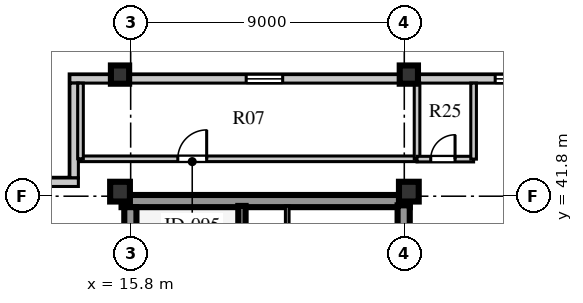
"""IFC4 building model, lengths in metres.
Left out: names, types, materials, properties, quantities, classifications, styles, units other than length and angle.
Written with IfcOpenShell. Run it as: python <this file> out.ifc"""

import sys

from ifc_helpers import new_model, si_unit, direction, frame, frame_2d, origin, origin_2d, place, context, subcontext, project, spatial, rectangle, extrude, element, fill, save


model = new_model("IFC4")
c1 = context("Model", 3, precision=1e-05, world=origin(), true_north=direction((0.0, 1.0)))
c2 = subcontext(c1, "Body", "Model", "MODEL_VIEW")
j1 = project(units=[si_unit("LENGTHUNIT", "METRE"), si_unit("PLANEANGLEUNIT", "RADIAN")], contexts=[c1])
p1 = place(None, origin())
s1 = spatial("IfcSite", under=j1, at=p1, CompositionType="ELEMENT")
p2 = place(p1, origin())
s2 = spatial("IfcBuilding", under=s1, at=p2, CompositionType="ELEMENT")
p3 = place(p2, frame((0.0, 0.0, 335.3)))
s3 = spatial("IfcBuildingStorey", under=s2, at=p3, CompositionType="ELEMENT", Elevation=335.3)
p4 = place(p3, frame((15.5, 41.64, 0.0), z_axis=(0.0, 0.0, 1.0), x_axis=(1.0, 0.0, 0.0)))
e1 = element("IfcWall", 1, at=p4, inside=s3, PredefinedType="SHEAR", context=c2, shape_type="SweptSolid", body=[
    extrude(rectangle(XDim=9.48, YDim=0.4, at=frame_2d((4.74, 0.0))), origin(), (0.0, 0.0, 1.0), 3.56),
])
p5 = place(p3, frame((15.79, 15.81, 0.0), z_axis=(0.0, 0.0, 1.0), x_axis=(0.0, 1.0, 0.0)))
e2 = element("IfcWall", 2, at=p5, inside=s3, PredefinedType="SHEAR", context=c2, shape_type="SweptSolid", body=[
    extrude(rectangle(XDim=25.63, YDim=0.4, at=frame_2d((12.815, 0.0))), origin(), (0.0, 0.0, 1.0), 3.56),
])
p6 = place(p3, frame((24.78, 15.74, 0.0), z_axis=(0.0, 0.0, 1.0), x_axis=(0.0, 1.0, 0.0)))
e3 = element("IfcWall", 3, at=p6, inside=s3, PredefinedType="SHEAR", context=c2, shape_type="SweptSolid", body=[
    extrude(rectangle(XDim=25.76, YDim=0.4, at=frame_2d((12.88, 0.0))), origin(), (0.0, 0.0, 1.0), 3.56),
])
p7 = place(p6, frame((1.61, 0.0, 0.0)))
e4 = element("IfcOpeningElement", 4, at=p7, cuts=e3, PredefinedType="OPENING", context=c2, shape_type="SweptSolid", body=[
    extrude(rectangle(XDim=1.2, YDim=2.1, at=frame_2d((0.6, 1.05))), frame((0.0, 0.21, 0.0), z_axis=(0.0, -1.0, 0.0), x_axis=(1.0, 0.0, 0.0)), (0.0, 0.0, 1.0), 0.42),
])
p8 = place(p6, frame((6.78, 0.0, 0.0)))
e5 = element("IfcOpeningElement", 5, at=p8, cuts=e3, PredefinedType="OPENING", context=c2, shape_type="SweptSolid", body=[
    extrude(rectangle(XDim=0.85, YDim=2.06, at=frame_2d((0.425, 1.03))), frame((0.0, 0.21, 0.0), z_axis=(0.0, -1.0, 0.0), x_axis=(1.0, 0.0, 0.0)), (0.0, 0.0, 1.0), 0.42),
])
p9 = place(p6, frame((12.11, 0.0, 0.0)))
e6 = element("IfcOpeningElement", 6, at=p9, cuts=e3, PredefinedType="OPENING", context=c2, shape_type="SweptSolid", body=[
    extrude(rectangle(XDim=1.5, YDim=2.12, at=frame_2d((0.75, 1.06))), frame((0.0, 0.21, 0.0), z_axis=(0.0, -1.0, 0.0), x_axis=(1.0, 0.0, 0.0)), (0.0, 0.0, 1.0), 0.42),
])
p10 = place(p6, frame((20.11, 0.0, 0.0)))
e7 = element("IfcOpeningElement", 7, at=p10, cuts=e3, PredefinedType="OPENING", context=c2, shape_type="SweptSolid", body=[
    extrude(rectangle(XDim=1.2, YDim=2.12, at=frame_2d((0.6, 1.06))), frame((0.0, 0.21, 0.0), z_axis=(0.0, -1.0, 0.0), x_axis=(1.0, 0.0, 0.0)), (0.0, 0.0, 1.0), 0.42),
])
p11 = place(p6, frame((24.01, 0.0, 0.0)))
e8 = element("IfcOpeningElement", 8, at=p11, cuts=e3, PredefinedType="OPENING", context=c2, shape_type="SweptSolid", body=[
    extrude(rectangle(XDim=0.95, YDim=2.1, at=frame_2d((0.475, 1.05))), frame((0.0, 0.21, 0.0), z_axis=(0.0, -1.0, 0.0), x_axis=(1.0, 0.0, 0.0)), (0.0, 0.0, 1.0), 0.42),
])
for number, where, z_axis, x_axis in (
    (9, (15.45, 41.95, 0.0), (0.0, 0.0, 1.0), (1.0, 0.0, 0.0)),
    (10, (24.95, 41.95, 0.0), (0.0, 0.0, 1.0), (1.0, 0.0, 0.0)),
):
    element("IfcColumn", number, at=place(p3, frame(where, z_axis=z_axis, x_axis=x_axis)), inside=s3, PredefinedType="COLUMN", context=c2, shape_type="SweptSolid", body=[
        extrude(rectangle(XDim=0.65, YDim=0.65, at=origin_2d()), origin(), (0.0, 0.0, 1.0), 3.56),
    ])
for number, where, z_axis, x_axis in (
    (11, (15.45, 45.8, 0.0), (0.0, 0.0, 1.0), (1.0, 0.0, 0.0)),
    (12, (24.95, 45.8, 0.0), (0.0, 0.0, 1.0), (1.0, 0.0, 0.0)),
):
    element("IfcColumn", number, at=place(p3, frame(where, z_axis=z_axis, x_axis=x_axis)), inside=s3, PredefinedType="COLUMN", context=c2, shape_type="SweptSolid", body=[
        extrude(rectangle(XDim=0.6, YDim=0.6, at=origin_2d()), origin(), (0.0, 0.0, 1.0), 3.56),
    ])
p12 = place(p3, frame((39.8, 45.66, 0.0), z_axis=(0.0, 0.0, 1.0), x_axis=(-1.0, 0.0, 0.0)))
e13 = element("IfcWall", 13, at=p12, inside=s3, PredefinedType="STANDARD", context=c2, shape_type="SweptSolid", body=[
    extrude(rectangle(XDim=26.0, YDim=0.28, at=frame_2d((13.0, 0.0))), origin(), (0.0, 0.0, 1.0), 2.92),
])
p13 = place(p12, frame((19.0, 0.0, 0.8)))
e14 = element("IfcOpeningElement", 14, at=p13, cuts=e13, PredefinedType="OPENING", context=c2, shape_type="SweptSolid", body=[
    extrude(rectangle(XDim=1.2, YDim=1.75, at=frame_2d((0.6, 0.875))), frame((0.0, 0.15, 0.0), z_axis=(0.0, -1.0, 0.0), x_axis=(1.0, 0.0, 0.0)), (0.0, 0.0, 1.0), 0.3),
])
p14 = place(p12, frame((9.61, 0.0, 0.8)))
e15 = element("IfcOpeningElement", 15, at=p14, cuts=e13, PredefinedType="OPENING", context=c2, shape_type="SweptSolid", body=[
    extrude(rectangle(XDim=2.4, YDim=2.05, at=frame_2d((1.2, 1.025))), frame((0.0, 0.15, 0.0), z_axis=(0.0, -1.0, 0.0), x_axis=(1.0, 0.0, 0.0)), (0.0, 0.0, 1.0), 0.3),
])
p15 = place(p12, frame((6.85, 0.0, 0.8)))
e16 = element("IfcOpeningElement", 16, at=p15, cuts=e13, PredefinedType="OPENING", context=c2, shape_type="SweptSolid", body=[
    extrude(rectangle(XDim=1.2, YDim=1.75, at=frame_2d((0.6, 0.875))), frame((0.0, 0.15, 0.0), z_axis=(0.0, -1.0, 0.0), x_axis=(1.0, 0.0, 0.0)), (0.0, 0.0, 1.0), 0.3),
])
p16 = place(p12, frame((1.8, 0.0, 0.8)))
e17 = element("IfcOpeningElement", 17, at=p16, cuts=e13, PredefinedType="OPENING", context=c2, shape_type="SweptSolid", body=[
    extrude(rectangle(XDim=1.35, YDim=1.9, at=frame_2d((0.675, 0.95))), frame((0.0, 0.15, 0.0), z_axis=(0.0, -1.0, 0.0), x_axis=(1.0, 0.0, 0.0)), (0.0, 0.0, 1.0), 0.3),
])
p17 = place(p3, frame((13.94, 45.52, 0.0), z_axis=(0.0, 0.0, 1.0), x_axis=(0.0, -1.0, 0.0)))
e18 = element("IfcWall", 18, at=p17, inside=s3, PredefinedType="STANDARD", context=c2, shape_type="SweptSolid", body=[
    extrude(rectangle(XDim=3.12, YDim=0.28, at=frame_2d((1.56, 0.0))), origin(), (0.0, 0.0, 1.0), 2.92),
])
p18 = place(p3, frame((14.08, 42.26, 0.0), z_axis=(0.0, 0.0, 1.0), x_axis=(-1.0, 0.0, 0.0)))
e19 = element("IfcWall", 19, at=p18, inside=s3, PredefinedType="STANDARD", context=c2, shape_type="SweptSolid", body=[
    extrude(rectangle(XDim=3.68, YDim=0.28, at=frame_2d((1.84, 0.0))), origin(), (0.0, 0.0, 1.0), 2.92),
])
p19 = place(p3, frame((19.46, 33.3, 0.0), z_axis=(0.0, 0.0, 1.0), x_axis=(0.0, 1.0, 0.0)))
e20 = element("IfcWall", 20, at=p19, inside=s3, PredefinedType="SHEAR", context=c2, shape_type="SweptSolid", body=[
    extrude(rectangle(XDim=8.18, YDim=0.24, at=frame_2d((4.09, 0.0))), origin(), (0.0, 0.0, 1.0), 3.8),
])
p20 = place(p19, frame((0.65, 0.0, 0.0)))
e21 = element("IfcOpeningElement", 21, at=p20, cuts=e20, PredefinedType="OPENING", context=c2, shape_type="SweptSolid", body=[
    extrude(rectangle(XDim=1.1, YDim=2.1, at=frame_2d((0.55, 1.05))), frame((0.0, 0.13, 0.0), z_axis=(0.0, -1.0, 0.0), x_axis=(1.0, 0.0, 0.0)), (0.0, 0.0, 1.0), 0.26),
])
p21 = place(p3, frame((20.95, 39.4, 0.0), z_axis=(0.0, 0.0, 1.0), x_axis=(0.0, 1.0, 0.0)))
e22 = element("IfcWall", 22, at=p21, inside=s3, PredefinedType="PARTITIONING", context=c2, shape_type="SweptSolid", body=[
    extrude(rectangle(XDim=2.08, YDim=0.12, at=frame_2d((1.04, 0.0))), origin(), (0.0, 0.0, 1.0), 3.56),
])
p22 = place(p21, frame((0.55, 0.0, 0.0)))
e23 = element("IfcOpeningElement", 23, at=p22, cuts=e22, PredefinedType="OPENING", context=c2, shape_type="SweptSolid", body=[
    extrude(rectangle(XDim=0.85, YDim=2.06, at=frame_2d((0.425, 1.03))), frame((0.0, 0.07, 0.0), z_axis=(0.0, -1.0, 0.0), x_axis=(1.0, 0.0, 0.0)), (0.0, 0.0, 1.0), 0.14),
])
p23 = place(p3, frame((14.15, 43.03, 0.0), z_axis=(0.0, 0.0, 1.0), x_axis=(1.0, 0.0, 0.0)))
e24 = element("IfcWall", 24, at=p23, inside=s3, PredefinedType="SOLIDWALL", context=c2, shape_type="SweptSolid", body=[
    extrude(rectangle(XDim=11.07, YDim=0.185, at=frame_2d((5.535, 0.0))), origin(), (0.0, 0.0, 1.0), 3.56),
])
p24 = place(p23, frame((3.2, 0.0, 0.0)))
e25 = element("IfcOpeningElement", 25, at=p24, cuts=e24, PredefinedType="OPENING", context=c2, shape_type="SweptSolid", body=[
    extrude(rectangle(XDim=0.95, YDim=2.08, at=frame_2d((0.475, 1.04))), frame((0.0, 0.103, 0.0), z_axis=(0.0, -1.0, 0.0), x_axis=(1.0, 0.0, 0.0)), (0.0, 0.0, 1.0), 0.205),
])
p25 = place(p3, frame((14.15, 43.03, 0.0), z_axis=(0.0, 0.0, 1.0), x_axis=(0.0, 1.0, 0.0)))
e26 = element("IfcWall", 26, at=p25, inside=s3, PredefinedType="SOLIDWALL", context=c2, shape_type="SweptSolid", body=[
    extrude(rectangle(XDim=2.49, YDim=0.185, at=frame_2d((1.245, 0.0))), origin(), (0.0, 0.0, 1.0), 3.56),
])
p26 = place(p3, frame((25.22, 43.03, 0.0), z_axis=(0.0, 0.0, 1.0), x_axis=(0.0, 1.0, 0.0)))
e27 = element("IfcWall", 27, at=p26, inside=s3, PredefinedType="SOLIDWALL", context=c2, shape_type="SweptSolid", body=[
    extrude(rectangle(XDim=2.49, YDim=0.185, at=frame_2d((1.245, 0.0))), origin(), (0.0, 0.0, 1.0), 3.11),
])
p27 = place(p3, frame((25.22, 43.02, 0.0), z_axis=(0.0, 0.0, 1.0), x_axis=(1.0, 0.0, 0.0)))
e28 = element("IfcWall", 28, at=p27, inside=s3, PredefinedType="SOLIDWALL", context=c2, shape_type="SweptSolid", body=[
    extrude(rectangle(XDim=1.86, YDim=0.185, at=frame_2d((0.93, 0.0))), origin(), (0.0, 0.0, 1.0), 3.56),
])
p28 = place(p27, frame((0.45, 0.0, 0.0)))
e29 = element("IfcOpeningElement", 29, at=p28, cuts=e28, PredefinedType="OPENING", context=c2, shape_type="SweptSolid", body=[
    extrude(rectangle(XDim=0.8, YDim=2.05, at=frame_2d((0.4, 1.025))), frame((0.0, 0.103, 0.0), z_axis=(0.0, -1.0, 0.0), x_axis=(1.0, 0.0, 0.0)), (0.0, 0.0, 1.0), 0.205),
])
p29 = place(p3, frame((27.08, 43.02, 0.0), z_axis=(0.0, 0.0, 1.0), x_axis=(0.0, 1.0, 0.0)))
e30 = element("IfcWall", 30, at=p29, inside=s3, PredefinedType="SOLIDWALL", context=c2, shape_type="SweptSolid", body=[
    extrude(rectangle(XDim=2.5, YDim=0.185, at=frame_2d((1.25, 0.0))), origin(), (0.0, 0.0, 1.0), 3.56),
])
p30 = place(p13, origin())
e31 = element("IfcWindow", 31, at=p30, inside=s3, PartitioningType="SINGLE_PANEL", PredefinedType="WINDOW", context=c2, shape_type="SweptSolid", body=[
    extrude(rectangle(XDim=1.2, YDim=1.75, at=frame_2d((0.6, 0.875))), frame((0.0, 0.03, 0.0), z_axis=(0.0, -1.0, 0.0), x_axis=(1.0, 0.0, 0.0)), (0.0, 0.0, 1.0), 0.06),
])
fill(e14, e31)
p31 = place(p14, origin())
e32 = element("IfcWindow", 32, at=p31, inside=s3, PartitioningType="SINGLE_PANEL", PredefinedType="WINDOW", context=c2, shape_type="SweptSolid", body=[
    extrude(rectangle(XDim=2.4, YDim=2.05, at=frame_2d((1.2, 1.025))), frame((0.0, 0.03, 0.0), z_axis=(0.0, -1.0, 0.0), x_axis=(1.0, 0.0, 0.0)), (0.0, 0.0, 1.0), 0.06),
])
fill(e15, e32)
p32 = place(p24, origin())
e33 = element("IfcDoor", 33, at=p32, inside=s3, OperationType="SINGLE_SWING_RIGHT", PredefinedType="DOOR", context=c2, shape_type="SweptSolid", body=[
    extrude(rectangle(XDim=0.95, YDim=2.08, at=frame_2d((0.475, 1.04))), frame((0.0, 0.025, 0.0), z_axis=(0.0, -1.0, 0.0), x_axis=(1.0, 0.0, 0.0)), (0.0, 0.0, 1.0), 0.05),
])
fill(e25, e33)
p33 = place(p28, frame((0.8, 0.0, 0.0), z_axis=(0.0, 0.0, 1.0), x_axis=(-1.0, 0.0, 0.0)))
e34 = element("IfcDoor", 34, at=p33, inside=s3, OperationType="SINGLE_SWING_LEFT", PredefinedType="DOOR", context=c2, shape_type="SweptSolid", body=[
    extrude(rectangle(XDim=0.8, YDim=2.05, at=frame_2d((0.4, 1.025))), frame((0.0, 0.025, 0.0), z_axis=(0.0, -1.0, 0.0), x_axis=(1.0, 0.0, 0.0)), (0.0, 0.0, 1.0), 0.05),
])
fill(e29, e34)
save(model, sys.argv[1])
